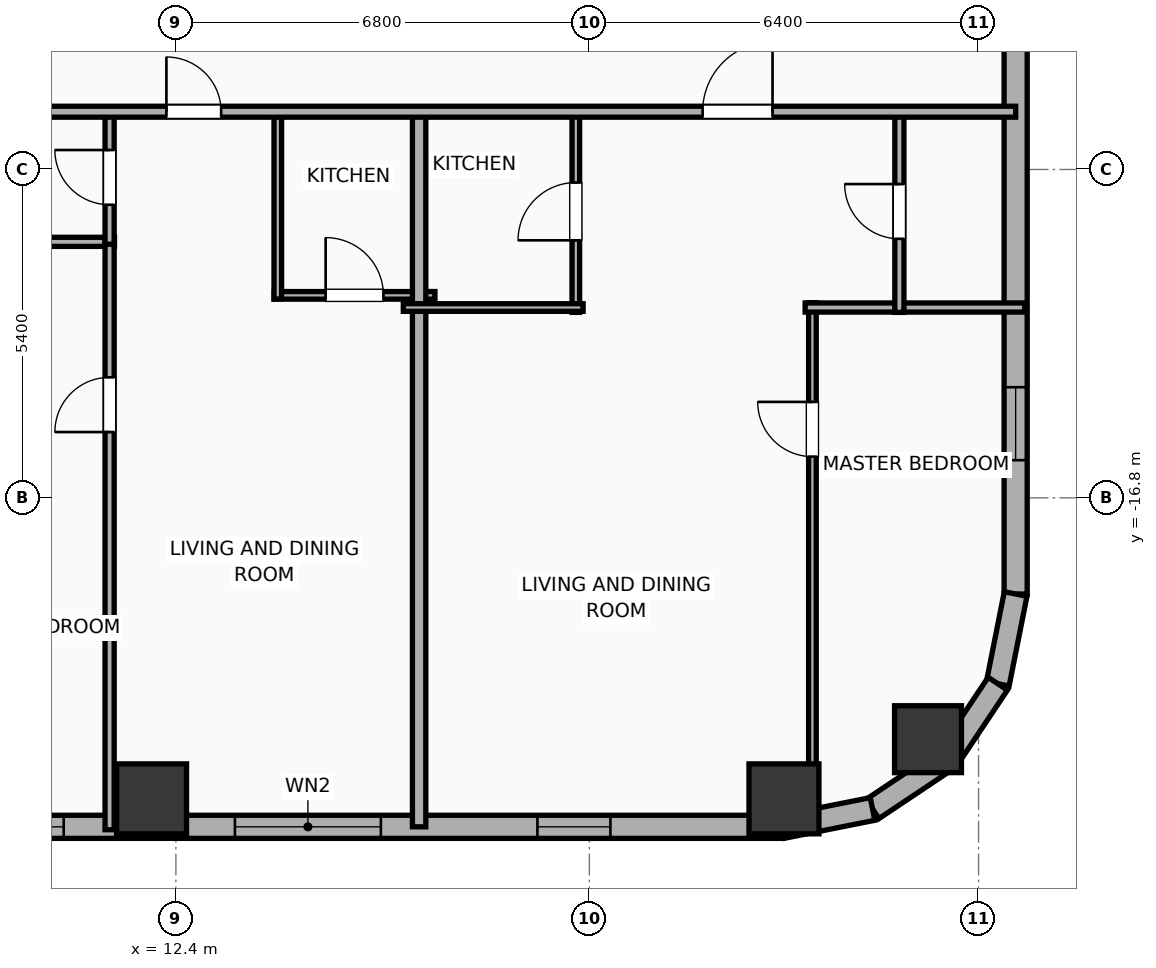
"""IFC4 building model, lengths in metres.
Left out: names, types, materials, properties, quantities, classifications, styles, units other than length and angle.
Written with IfcOpenShell. Run it as: python <this file> out.ifc"""

import sys

from ifc_helpers import new_model, si_unit, direction, frame, frame_2d, origin, origin_2d, place, context, subcontext, project, spatial, rectangle, hollow_rectangle, hollow_circle, extrude, element, fill, save


model = new_model("IFC4")
c1 = context("Model", 3, precision=1e-05, world=origin(), true_north=direction((0.0, 1.0)))
c2 = subcontext(c1, "Body", "Model", "MODEL_VIEW")
j1 = project(units=[si_unit("LENGTHUNIT", "METRE"), si_unit("PLANEANGLEUNIT", "RADIAN")], contexts=[c1])
p1 = place(None, origin())
s1 = spatial("IfcSite", under=j1, at=p1, CompositionType="ELEMENT")
p2 = place(p1, origin())
s2 = spatial("IfcBuilding", under=s1, at=p2, CompositionType="ELEMENT")
p3 = place(p2, frame((0.0, 0.0, 57.2)))
s3 = spatial("IfcBuildingStorey", under=s2, at=p3, CompositionType="ELEMENT", Elevation=57.2)
for number, where, z_axis, x_axis in (
    (1, (12.0, -21.75, 0.0), (0.0, 0.0, 1.0), (1.0, 0.0, 0.0)),
    (2, (22.4, -21.75, 0.0), (0.0, 0.0, 1.0), (1.0, 0.0, 0.0)),
):
    element("IfcColumn", number, at=place(p3, frame(where, z_axis=z_axis, x_axis=x_axis)), inside=s3, PredefinedType="COLUMN", context=c2, shape_type="SweptSolid", body=[
        extrude(hollow_rectangle(XDim=1.15, YDim=1.15, WallThickness=0.04, at=origin_2d()), origin(), (0.0, 0.0, 1.0), 3.9),
    ])
p4 = place(p3, frame((24.769, -20.769, 0.0), z_axis=(0.0, 0.0, 1.0), x_axis=(1.0, 0.0, 0.0)))
e3 = element("IfcColumn", 3, at=p4, inside=s3, PredefinedType="COLUMN", context=c2, shape_type="SweptSolid", body=[
    extrude(hollow_circle(Radius=0.55, WallThickness=0.036, at=origin_2d()), origin(), (0.0, 0.0, 1.0), 3.9),
])
p5 = place(p3, frame((22.381, -22.21, 0.0), z_axis=(0.0, 0.0, 1.0), x_axis=(-1.0, 0.0, 0.0)))
e4 = element("IfcWall", 4, at=p5, inside=s3, PredefinedType="ELEMENTEDWALL", context=c2, shape_type="SweptSolid", body=[
    extrude(rectangle(XDim=51.963, YDim=0.38, at=frame_2d((25.981, 0.0))), origin(), (0.0, 0.0, 1.0), 3.65),
])
p6 = place(p5, frame((6.61, 0.0, 0.75)))
e5 = element("IfcOpeningElement", 5, at=p6, cuts=e4, PredefinedType="OPENING", context=c2, shape_type="SweptSolid", body=[
    extrude(rectangle(XDim=2.4, YDim=2.1, at=frame_2d((1.2, 1.05))), frame((0.0, 0.2, 0.0), z_axis=(0.0, -1.0, 0.0), x_axis=(1.0, 0.0, 0.0)), (0.0, 0.0, 1.0), 0.4),
])
p7 = place(p5, frame((25.631, 0.0, 0.75)))
e6 = element("IfcOpeningElement", 6, at=p7, cuts=e4, PredefinedType="OPENING", context=c2, shape_type="SweptSolid", body=[
    extrude(rectangle(XDim=2.4, YDim=2.1, at=frame_2d((1.2, 1.05))), frame((0.0, 0.2, 0.0), z_axis=(0.0, -1.0, 0.0), x_axis=(1.0, 0.0, 0.0)), (0.0, 0.0, 1.0), 0.4),
])
p8 = place(p5, frame((49.132, 0.0, 0.75)))
e7 = element("IfcOpeningElement", 7, at=p8, cuts=e4, PredefinedType="OPENING", context=c2, shape_type="SweptSolid", body=[
    extrude(rectangle(XDim=1.2, YDim=2.05, at=frame_2d((0.6, 1.025))), frame((0.0, 0.2, 0.0), z_axis=(0.0, -1.0, 0.0), x_axis=(1.0, 0.0, 0.0)), (0.0, 0.0, 1.0), 0.4),
])
p9 = place(p5, frame((46.086, 0.0, 0.75)))
e8 = element("IfcOpeningElement", 8, at=p9, cuts=e4, PredefinedType="OPENING", context=c2, shape_type="SweptSolid", body=[
    extrude(rectangle(XDim=1.2, YDim=2.05, at=frame_2d((0.6, 1.025))), frame((0.0, 0.2, 0.0), z_axis=(0.0, -1.0, 0.0), x_axis=(1.0, 0.0, 0.0)), (0.0, 0.0, 1.0), 0.4),
])
p10 = place(p5, frame((42.426, 0.0, 0.75)))
e9 = element("IfcOpeningElement", 9, at=p10, cuts=e4, PredefinedType="OPENING", context=c2, shape_type="SweptSolid", body=[
    extrude(rectangle(XDim=1.2, YDim=2.05, at=frame_2d((0.6, 1.025))), frame((0.0, 0.2, 0.0), z_axis=(0.0, -1.0, 0.0), x_axis=(1.0, 0.0, 0.0)), (0.0, 0.0, 1.0), 0.4),
])
p11 = place(p5, frame((38.286, 0.0, 0.75)))
e10 = element("IfcOpeningElement", 10, at=p11, cuts=e4, PredefinedType="OPENING", context=c2, shape_type="SweptSolid", body=[
    extrude(rectangle(XDim=1.2, YDim=2.05, at=frame_2d((0.6, 1.025))), frame((0.0, 0.2, 0.0), z_axis=(0.0, -1.0, 0.0), x_axis=(1.0, 0.0, 0.0)), (0.0, 0.0, 1.0), 0.4),
])
p12 = place(p5, frame((35.219, 0.0, 0.75)))
e11 = element("IfcOpeningElement", 11, at=p12, cuts=e4, PredefinedType="OPENING", context=c2, shape_type="SweptSolid", body=[
    extrude(rectangle(XDim=1.2, YDim=2.05, at=frame_2d((0.6, 1.025))), frame((0.0, 0.2, 0.0), z_axis=(0.0, -1.0, 0.0), x_axis=(1.0, 0.0, 0.0)), (0.0, 0.0, 1.0), 0.4),
])
p13 = place(p5, frame((32.039, 0.0, 0.75)))
e12 = element("IfcOpeningElement", 12, at=p13, cuts=e4, PredefinedType="OPENING", context=c2, shape_type="SweptSolid", body=[
    extrude(rectangle(XDim=1.2, YDim=2.05, at=frame_2d((0.6, 1.025))), frame((0.0, 0.2, 0.0), z_axis=(0.0, -1.0, 0.0), x_axis=(1.0, 0.0, 0.0)), (0.0, 0.0, 1.0), 0.4),
])
p14 = place(p5, frame((22.686, 0.0, 0.75)))
e13 = element("IfcOpeningElement", 13, at=p14, cuts=e4, PredefinedType="OPENING", context=c2, shape_type="SweptSolid", body=[
    extrude(rectangle(XDim=1.2, YDim=2.05, at=frame_2d((0.6, 1.025))), frame((0.0, 0.2, 0.0), z_axis=(0.0, -1.0, 0.0), x_axis=(1.0, 0.0, 0.0)), (0.0, 0.0, 1.0), 0.4),
])
p15 = place(p5, frame((18.786, 0.0, 0.75)))
e14 = element("IfcOpeningElement", 14, at=p15, cuts=e4, PredefinedType="OPENING", context=c2, shape_type="SweptSolid", body=[
    extrude(rectangle(XDim=1.2, YDim=2.05, at=frame_2d((0.6, 1.025))), frame((0.0, 0.2, 0.0), z_axis=(0.0, -1.0, 0.0), x_axis=(1.0, 0.0, 0.0)), (0.0, 0.0, 1.0), 0.4),
])
p16 = place(p5, frame((14.886, 0.0, 0.75)))
e15 = element("IfcOpeningElement", 15, at=p16, cuts=e4, PredefinedType="OPENING", context=c2, shape_type="SweptSolid", body=[
    extrude(rectangle(XDim=1.2, YDim=2.05, at=frame_2d((0.6, 1.025))), frame((0.0, 0.2, 0.0), z_axis=(0.0, -1.0, 0.0), x_axis=(1.0, 0.0, 0.0)), (0.0, 0.0, 1.0), 0.4),
])
p17 = place(p5, frame((11.826, 0.0, 0.75)))
e16 = element("IfcOpeningElement", 16, at=p17, cuts=e4, PredefinedType="OPENING", context=c2, shape_type="SweptSolid", body=[
    extrude(rectangle(XDim=1.2, YDim=2.05, at=frame_2d((0.6, 1.025))), frame((0.0, 0.2, 0.0), z_axis=(0.0, -1.0, 0.0), x_axis=(1.0, 0.0, 0.0)), (0.0, 0.0, 1.0), 0.4),
])
p18 = place(p5, frame((2.836, 0.0, 0.75)))
e17 = element("IfcOpeningElement", 17, at=p18, cuts=e4, PredefinedType="OPENING", context=c2, shape_type="SweptSolid", body=[
    extrude(rectangle(XDim=1.2, YDim=2.05, at=frame_2d((0.6, 1.025))), frame((0.0, 0.2, 0.0), z_axis=(0.0, -1.0, 0.0), x_axis=(1.0, 0.0, 0.0)), (0.0, 0.0, 1.0), 0.4),
])
p19 = place(p3, frame((26.21, 18.381, 0.0), z_axis=(0.0, 0.0, 1.0), x_axis=(0.0, -1.0, 0.0)))
e18 = element("IfcWall", 18, at=p19, inside=s3, PredefinedType="ELEMENTEDWALL", context=c2, shape_type="SweptSolid", body=[
    extrude(rectangle(XDim=36.763, YDim=0.38, at=frame_2d((18.381, 0.0))), origin(), (0.0, 0.0, 1.0), 3.65),
])
p20 = place(p19, frame((33.362, 0.0, 0.75)))
e19 = element("IfcOpeningElement", 19, at=p20, cuts=e18, PredefinedType="OPENING", context=c2, shape_type="SweptSolid", body=[
    extrude(rectangle(XDim=1.2, YDim=2.05, at=frame_2d((0.6, 1.025))), frame((0.0, 0.2, 0.0), z_axis=(0.0, -1.0, 0.0), x_axis=(1.0, 0.0, 0.0)), (0.0, 0.0, 1.0), 0.4),
])
p21 = place(p3, frame((26.21, -18.381, 0.0), z_axis=(0.0, 0.0, 1.0), x_axis=(-0.195086038585, -0.980786132421, 0.0)))
e20 = element("IfcWall", 20, at=p21, inside=s3, PredefinedType="ELEMENTEDWALL", context=c2, shape_type="SweptSolid", body=[
    extrude(rectangle(XDim=1.504, YDim=0.38, at=frame_2d((0.752, 0.0))), origin(), (0.0, 0.0, 1.0), 3.65),
])
for number, where, z_axis, x_axis in (
    (21, (25.917, -19.857, 0.0), (0.0, 0.0, 1.0), (-0.556, -0.831, 0.0)),
    (22, (25.091, -21.091, 0.0), (0.0, 0.0, 1.0), (-0.831, -0.556, 0.0)),
):
    element("IfcWall", number, at=place(p3, frame(where, z_axis=z_axis, x_axis=x_axis)), inside=s3, PredefinedType="ELEMENTEDWALL", context=c2, shape_type="SweptSolid", body=[
        extrude(rectangle(XDim=1.485, YDim=0.38, at=frame_2d((0.743, 0.0))), origin(), (0.0, 0.0, 1.0), 3.65),
    ])
p22 = place(p3, frame((23.857, -21.917, 0.0), z_axis=(0.0, 0.0, 1.0), x_axis=(-0.980786132421, -0.195086038585, 0.0)))
e23 = element("IfcWall", 23, at=p22, inside=s3, PredefinedType="ELEMENTEDWALL", context=c2, shape_type="SweptSolid", body=[
    extrude(rectangle(XDim=1.504, YDim=0.38, at=frame_2d((0.752, 0.0))), origin(), (0.0, 0.0, 1.0), 3.65),
])
p23 = place(p3, frame((8.34, -12.59, 0.0), z_axis=(0.0, 0.0, 1.0), x_axis=(1.0, 0.0, 0.0)))
e24 = element("IfcWall", 24, at=p23, inside=s3, PredefinedType="PLUMBINGWALL", context=c2, shape_type="SweptSolid", body=[
    extrude(rectangle(XDim=3.05, YDim=0.15, at=frame_2d((1.525, 0.0))), origin(), (0.0, 0.0, 1.0), 3.65),
])
p24 = place(p3, frame((11.31, -22.258, 0.0), z_axis=(0.0, 0.0, 1.0), x_axis=(0.0, 1.0, 0.0)))
e25 = element("IfcWall", 25, at=p24, inside=s3, PredefinedType="PLUMBINGWALL", context=c2, shape_type="SweptSolid", body=[
    extrude(rectangle(XDim=9.708, YDim=0.15, at=frame_2d((4.854, 0.0))), origin(), (0.0, 0.0, 1.0), 3.65),
])
p25 = place(p24, frame((6.54, 0.0, 0.0)))
e26 = element("IfcOpeningElement", 26, at=p25, cuts=e25, PredefinedType="OPENING", context=c2, shape_type="SweptSolid", body=[
    extrude(rectangle(XDim=0.9, YDim=2.05, at=frame_2d((0.45, 1.025))), frame((0.0, 0.085, 0.0), z_axis=(0.0, -1.0, 0.0), x_axis=(1.0, 0.0, 0.0)), (0.0, 0.0, 1.0), 0.17),
])
p26 = place(p3, frame((11.31, -12.63, 0.0), z_axis=(0.0, 0.0, 1.0), x_axis=(0.0, 1.0, 0.0)))
e27 = element("IfcWall", 27, at=p26, inside=s3, PredefinedType="PLUMBINGWALL", context=c2, shape_type="SweptSolid", body=[
    extrude(rectangle(XDim=2.2, YDim=0.15, at=frame_2d((1.1, 0.0))), origin(), (0.0, 0.0, 1.0), 3.65),
])
p27 = place(p26, frame((0.65, 0.0, 0.0)))
e28 = element("IfcOpeningElement", 28, at=p27, cuts=e27, PredefinedType="OPENING", context=c2, shape_type="SweptSolid", body=[
    extrude(rectangle(XDim=0.9, YDim=2.05, at=frame_2d((0.45, 1.025))), frame((0.0, 0.085, 0.0), z_axis=(0.0, -1.0, 0.0), x_axis=(1.0, 0.0, 0.0)), (0.0, 0.0, 1.0), 0.17),
])
p28 = place(p3, frame((14.016, -13.47, 0.0), z_axis=(0.0, 0.0, 1.0), x_axis=(1.0, 0.0, 0.0)))
e29 = element("IfcWall", 29, at=p28, inside=s3, PredefinedType="PARTITIONING", context=c2, shape_type="SweptSolid", body=[
    extrude(rectangle(XDim=2.644, YDim=0.125, at=frame_2d((1.322, 0.0))), origin(), (0.0, 0.0, 1.0), 3.65),
])
p29 = place(p28, frame((0.847, 0.0, 0.0)))
e30 = element("IfcOpeningElement", 30, at=p29, cuts=e29, PredefinedType="OPENING", context=c2, shape_type="SweptSolid", body=[
    extrude(rectangle(XDim=0.95, YDim=2.05, at=frame_2d((0.475, 1.025))), frame((0.0, 0.073, 0.0), z_axis=(0.0, -1.0, 0.0), x_axis=(1.0, 0.0, 0.0)), (0.0, 0.0, 1.0), 0.145),
])
p30 = place(p3, frame((14.076, -13.53, 0.0), z_axis=(0.0, 0.0, 1.0), x_axis=(0.0, 1.0, 0.0)))
e31 = element("IfcWall", 31, at=p30, inside=s3, PredefinedType="PARTITIONING", context=c2, shape_type="SweptSolid", body=[
    extrude(rectangle(XDim=3.1, YDim=0.125, at=frame_2d((1.55, 0.0))), origin(), (0.0, 0.0, 1.0), 3.65),
])
p31 = place(p3, frame((16.4, -22.21, 0.0), z_axis=(0.0, 0.0, 1.0), x_axis=(0.0, 1.0, 0.0)))
e32 = element("IfcWall", 32, at=p31, inside=s3, PredefinedType="PARTITIONING", context=c2, shape_type="SweptSolid", body=[
    extrude(rectangle(XDim=11.84, YDim=0.22, at=frame_2d((5.92, 0.0))), origin(), (0.0, 0.0, 1.0), 3.65),
])
p32 = place(p3, frame((22.868, -22.266, 0.0), z_axis=(0.0, 0.0, 1.0), x_axis=(0.0, 1.0, 0.0)))
e33 = element("IfcWall", 33, at=p32, inside=s3, PredefinedType="PARTITIONING", context=c2, shape_type="SweptSolid", body=[
    extrude(rectangle(XDim=8.676, YDim=0.125, at=frame_2d((4.338, 0.0))), origin(), (0.0, 0.0, 1.0), 3.65),
])
p33 = place(p32, frame((6.144, 0.0, 0.0)))
e34 = element("IfcOpeningElement", 34, at=p33, cuts=e33, PredefinedType="OPENING", context=c2, shape_type="SweptSolid", body=[
    extrude(rectangle(XDim=0.9, YDim=2.05, at=frame_2d((0.45, 1.025))), frame((0.0, 0.073, 0.0), z_axis=(0.0, -1.0, 0.0), x_axis=(1.0, 0.0, 0.0)), (0.0, 0.0, 1.0), 0.145),
])
p34 = place(p3, frame((22.748, -13.67, 0.0), z_axis=(0.0, 0.0, 1.0), x_axis=(1.0, 0.0, 0.0)))
e35 = element("IfcWall", 35, at=p34, inside=s3, PredefinedType="PLUMBINGWALL", context=c2, shape_type="SweptSolid", body=[
    extrude(rectangle(XDim=3.612, YDim=0.15, at=frame_2d((1.806, 0.0))), origin(), (0.0, 0.0, 1.0), 3.65),
])
p35 = place(p3, frame((18.977, -13.75, 0.0), z_axis=(0.0, 0.0, 1.0), x_axis=(0.0, 1.0, 0.0)))
e36 = element("IfcWall", 36, at=p35, inside=s3, PredefinedType="PARTITIONING", context=c2, shape_type="SweptSolid", body=[
    extrude(rectangle(XDim=3.32, YDim=0.125, at=frame_2d((1.66, 0.0))), origin(), (0.0, 0.0, 1.0), 3.65),
])
p36 = place(p35, frame((1.185, 0.0, 0.0)))
e37 = element("IfcOpeningElement", 37, at=p36, cuts=e36, PredefinedType="OPENING", context=c2, shape_type="SweptSolid", body=[
    extrude(rectangle(XDim=0.95, YDim=2.05, at=frame_2d((0.475, 1.025))), frame((0.0, 0.073, 0.0), z_axis=(0.0, -1.0, 0.0), x_axis=(1.0, 0.0, 0.0)), (0.0, 0.0, 1.0), 0.145),
])
p37 = place(p3, frame((16.14, -13.67, 0.0), z_axis=(0.0, 0.0, 1.0), x_axis=(1.0, 0.0, 0.0)))
e38 = element("IfcWall", 38, at=p37, inside=s3, PredefinedType="PARTITIONING", context=c2, shape_type="SweptSolid", body=[
    extrude(rectangle(XDim=2.957, YDim=0.125, at=frame_2d((1.479, 0.0))), origin(), (0.0, 0.0, 1.0), 3.65),
])
p38 = place(p3, frame((24.298, -13.75, 0.0), z_axis=(0.0, 0.0, 1.0), x_axis=(0.0, 1.0, 0.0)))
e39 = element("IfcWall", 39, at=p38, inside=s3, PredefinedType="PLUMBINGWALL", context=c2, shape_type="SweptSolid", body=[
    extrude(rectangle(XDim=3.32, YDim=0.15, at=frame_2d((1.66, 0.0))), origin(), (0.0, 0.0, 1.0), 3.65),
])
p39 = place(p38, frame((1.21, 0.0, 0.0)))
e40 = element("IfcOpeningElement", 40, at=p39, cuts=e39, PredefinedType="OPENING", context=c2, shape_type="SweptSolid", body=[
    extrude(rectangle(XDim=0.9, YDim=2.05, at=frame_2d((0.45, 1.025))), frame((0.0, 0.085, 0.0), z_axis=(0.0, -1.0, 0.0), x_axis=(1.0, 0.0, 0.0)), (0.0, 0.0, 1.0), 0.17),
])
p40 = place(p3, frame((-33.41, -10.45, 0.0), z_axis=(0.0, 0.0, 1.0), x_axis=(1.0, 0.0, 0.0)))
e41 = element("IfcWall", 41, at=p40, inside=s3, PredefinedType="PARTITIONING", context=c2, shape_type="SweptSolid", body=[
    extrude(rectangle(XDim=59.62, YDim=0.18, at=frame_2d((29.81, 0.0))), origin(), (0.0, 0.0, 1.0), 3.65),
])
p41 = place(p40, frame((5.321, 0.0, 0.0)))
e42 = element("IfcOpeningElement", 42, at=p41, cuts=e41, PredefinedType="OPENING", context=c2, shape_type="SweptSolid", body=[
    extrude(rectangle(XDim=1.15, YDim=2.05, at=frame_2d((0.575, 1.025))), frame((0.0, 0.1, 0.0), z_axis=(0.0, -1.0, 0.0), x_axis=(1.0, 0.0, 0.0)), (0.0, 0.0, 1.0), 0.2),
])
p42 = place(p40, frame((14.3, 0.0, 0.0)))
e43 = element("IfcOpeningElement", 43, at=p42, cuts=e41, PredefinedType="OPENING", context=c2, shape_type="SweptSolid", body=[
    extrude(rectangle(XDim=1.15, YDim=2.05, at=frame_2d((0.575, 1.025))), frame((0.0, 0.1, 0.0), z_axis=(0.0, -1.0, 0.0), x_axis=(1.0, 0.0, 0.0)), (0.0, 0.0, 1.0), 0.2),
])
p43 = place(p40, frame((22.265, 0.0, 0.0)))
e44 = element("IfcOpeningElement", 44, at=p43, cuts=e41, PredefinedType="OPENING", context=c2, shape_type="SweptSolid", body=[
    extrude(rectangle(XDim=0.9, YDim=2.05, at=frame_2d((0.45, 1.025))), frame((0.0, 0.1, 0.0), z_axis=(0.0, -1.0, 0.0), x_axis=(1.0, 0.0, 0.0)), (0.0, 0.0, 1.0), 0.2),
])
p44 = place(p40, frame((29.903, 0.0, 0.0)))
e45 = element("IfcOpeningElement", 45, at=p44, cuts=e41, PredefinedType="OPENING", context=c2, shape_type="SweptSolid", body=[
    extrude(rectangle(XDim=1.15, YDim=2.05, at=frame_2d((0.575, 1.025))), frame((0.0, 0.1, 0.0), z_axis=(0.0, -1.0, 0.0), x_axis=(1.0, 0.0, 0.0)), (0.0, 0.0, 1.0), 0.2),
])
p45 = place(p40, frame((37.701, 0.0, 0.0)))
e46 = element("IfcOpeningElement", 46, at=p45, cuts=e41, PredefinedType="OPENING", context=c2, shape_type="SweptSolid", body=[
    extrude(rectangle(XDim=1.15, YDim=2.05, at=frame_2d((0.575, 1.025))), frame((0.0, 0.1, 0.0), z_axis=(0.0, -1.0, 0.0), x_axis=(1.0, 0.0, 0.0)), (0.0, 0.0, 1.0), 0.2),
])
p46 = place(p40, frame((45.654, 0.0, 0.0)))
e47 = element("IfcOpeningElement", 47, at=p46, cuts=e41, PredefinedType="OPENING", context=c2, shape_type="SweptSolid", body=[
    extrude(rectangle(XDim=0.9, YDim=2.05, at=frame_2d((0.45, 1.025))), frame((0.0, 0.1, 0.0), z_axis=(0.0, -1.0, 0.0), x_axis=(1.0, 0.0, 0.0)), (0.0, 0.0, 1.0), 0.2),
])
p47 = place(p40, frame((54.472, 0.0, 0.0)))
e48 = element("IfcOpeningElement", 48, at=p47, cuts=e41, PredefinedType="OPENING", context=c2, shape_type="SweptSolid", body=[
    extrude(rectangle(XDim=1.15, YDim=2.05, at=frame_2d((0.575, 1.025))), frame((0.0, 0.1, 0.0), z_axis=(0.0, -1.0, 0.0), x_axis=(1.0, 0.0, 0.0)), (0.0, 0.0, 1.0), 0.2),
])
p48 = place(p6, origin())
e49 = element("IfcWindow", 49, at=p48, inside=s3, PartitioningType="SINGLE_PANEL", PredefinedType="WINDOW", context=c2, shape_type="SweptSolid", body=[
    extrude(rectangle(XDim=2.4, YDim=2.1, at=frame_2d((1.2, 1.05))), frame((0.0, 0.03, 0.0), z_axis=(0.0, -1.0, 0.0), x_axis=(1.0, 0.0, 0.0)), (0.0, 0.0, 1.0), 0.06),
])
fill(e5, e49)
p49 = place(p17, origin())
e50 = element("IfcWindow", 50, at=p49, inside=s3, PartitioningType="SINGLE_PANEL", PredefinedType="WINDOW", context=c2, shape_type="SweptSolid", body=[
    extrude(rectangle(XDim=1.2, YDim=2.05, at=frame_2d((0.6, 1.025))), frame((0.0, 0.03, 0.0), z_axis=(0.0, -1.0, 0.0), x_axis=(1.0, 0.0, 0.0)), (0.0, 0.0, 1.0), 0.06),
])
fill(e16, e50)
p50 = place(p18, origin())
e51 = element("IfcWindow", 51, at=p50, inside=s3, PartitioningType="SINGLE_PANEL", PredefinedType="WINDOW", context=c2, shape_type="SweptSolid", body=[
    extrude(rectangle(XDim=1.2, YDim=2.05, at=frame_2d((0.6, 1.025))), frame((0.0, 0.03, 0.0), z_axis=(0.0, -1.0, 0.0), x_axis=(1.0, 0.0, 0.0)), (0.0, 0.0, 1.0), 0.06),
])
fill(e17, e51)
p51 = place(p20, origin())
e52 = element("IfcWindow", 52, at=p51, inside=s3, PartitioningType="SINGLE_PANEL", PredefinedType="WINDOW", context=c2, shape_type="SweptSolid", body=[
    extrude(rectangle(XDim=1.2, YDim=2.05, at=frame_2d((0.6, 1.025))), frame((0.0, 0.03, 0.0), z_axis=(0.0, -1.0, 0.0), x_axis=(1.0, 0.0, 0.0)), (0.0, 0.0, 1.0), 0.06),
])
fill(e19, e52)
p52 = place(p25, origin())
e53 = element("IfcDoor", 53, at=p52, inside=s3, OperationType="SINGLE_SWING_LEFT", PredefinedType="DOOR", context=c2, shape_type="SweptSolid", body=[
    extrude(rectangle(XDim=0.9, YDim=2.05, at=frame_2d((0.45, 1.025))), frame((0.0, 0.025, 0.0), z_axis=(0.0, -1.0, 0.0), x_axis=(1.0, 0.0, 0.0)), (0.0, 0.0, 1.0), 0.05),
])
fill(e26, e53)
p53 = place(p27, origin())
e54 = element("IfcDoor", 54, at=p53, inside=s3, OperationType="SINGLE_SWING_RIGHT", PredefinedType="DOOR", context=c2, shape_type="SweptSolid", body=[
    extrude(rectangle(XDim=0.9, YDim=2.05, at=frame_2d((0.45, 1.025))), frame((0.0, 0.025, 0.0), z_axis=(0.0, -1.0, 0.0), x_axis=(1.0, 0.0, 0.0)), (0.0, 0.0, 1.0), 0.05),
])
fill(e28, e54)
p54 = place(p29, origin())
e55 = element("IfcDoor", 55, at=p54, inside=s3, OperationType="SINGLE_SWING_LEFT", PredefinedType="DOOR", context=c2, shape_type="SweptSolid", body=[
    extrude(rectangle(XDim=0.95, YDim=2.05, at=frame_2d((0.475, 1.025))), frame((0.0, 0.025, 0.0), z_axis=(0.0, -1.0, 0.0), x_axis=(1.0, 0.0, 0.0)), (0.0, 0.0, 1.0), 0.05),
])
fill(e30, e55)
p55 = place(p33, origin())
e56 = element("IfcDoor", 56, at=p55, inside=s3, OperationType="SINGLE_SWING_RIGHT", PredefinedType="DOOR", context=c2, shape_type="SweptSolid", body=[
    extrude(rectangle(XDim=0.9, YDim=2.05, at=frame_2d((0.45, 1.025))), frame((0.0, 0.025, 0.0), z_axis=(0.0, -1.0, 0.0), x_axis=(1.0, 0.0, 0.0)), (0.0, 0.0, 1.0), 0.05),
])
fill(e34, e56)
p56 = place(p36, origin())
e57 = element("IfcDoor", 57, at=p56, inside=s3, OperationType="SINGLE_SWING_LEFT", PredefinedType="DOOR", context=c2, shape_type="SweptSolid", body=[
    extrude(rectangle(XDim=0.95, YDim=2.05, at=frame_2d((0.475, 1.025))), frame((0.0, 0.025, 0.0), z_axis=(0.0, -1.0, 0.0), x_axis=(1.0, 0.0, 0.0)), (0.0, 0.0, 1.0), 0.05),
])
fill(e37, e57)
p57 = place(p39, origin())
e58 = element("IfcDoor", 58, at=p57, inside=s3, OperationType="SINGLE_SWING_RIGHT", PredefinedType="DOOR", context=c2, shape_type="SweptSolid", body=[
    extrude(rectangle(XDim=0.9, YDim=2.05, at=frame_2d((0.45, 1.025))), frame((0.0, 0.025, 0.0), z_axis=(0.0, -1.0, 0.0), x_axis=(1.0, 0.0, 0.0)), (0.0, 0.0, 1.0), 0.05),
])
fill(e40, e58)
p58 = place(p46, origin())
e59 = element("IfcDoor", 59, at=p58, inside=s3, OperationType="SINGLE_SWING_LEFT", PredefinedType="DOOR", context=c2, shape_type="SweptSolid", body=[
    extrude(rectangle(XDim=0.9, YDim=2.05, at=frame_2d((0.45, 1.025))), frame((0.0, 0.025, 0.0), z_axis=(0.0, -1.0, 0.0), x_axis=(1.0, 0.0, 0.0)), (0.0, 0.0, 1.0), 0.05),
])
fill(e47, e59)
p59 = place(p47, origin())
e60 = element("IfcDoor", 60, at=p59, inside=s3, OperationType="SINGLE_SWING_RIGHT", PredefinedType="DOOR", context=c2, shape_type="SweptSolid", body=[
    extrude(rectangle(XDim=1.15, YDim=2.05, at=frame_2d((0.575, 1.025))), frame((0.0, 0.025, 0.0), z_axis=(0.0, -1.0, 0.0), x_axis=(1.0, 0.0, 0.0)), (0.0, 0.0, 1.0), 0.05),
])
fill(e48, e60)
save(model, sys.argv[1])
